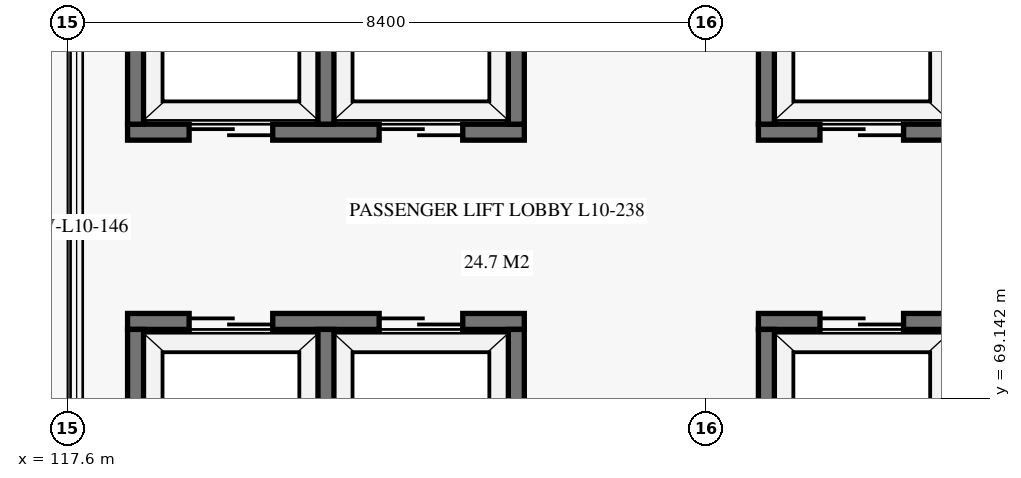
"""IFC4 building model, lengths in metres.
Left out: names, types, materials, properties, quantities, classifications, styles, units other than length and angle.
Written with IfcOpenShell. Run it as: python <this file> out.ifc"""

import sys

from ifc_helpers import new_model, si_unit, direction, frame, frame_2d, origin, place, context, subcontext, project, spatial, rectangle, extrude, element, fill, save


model = new_model("IFC4")
c1 = context("Model", 3, precision=1e-05, world=origin(), true_north=direction((0.0, 1.0)))
c2 = subcontext(c1, "Body", "Model", "MODEL_VIEW")
j1 = project(units=[si_unit("LENGTHUNIT", "METRE"), si_unit("PLANEANGLEUNIT", "RADIAN")], contexts=[c1])
p1 = place(None, origin())
s1 = spatial("IfcSite", under=j1, at=p1, CompositionType="ELEMENT")
p2 = place(p1, origin())
s2 = spatial("IfcBuilding", under=s1, at=p2, CompositionType="ELEMENT")
p3 = place(p2, frame((0.0, 0.0, 42.7)))
s3 = spatial("IfcBuildingStorey", under=s2, at=p3, CompositionType="ELEMENT", Elevation=42.7)
p4 = place(p3, frame((126.69, 70.155, 0.0), z_axis=(0.0, 0.0, 1.0), x_axis=(1.0, 0.0, 0.0)))
e1 = element("IfcWall", 1, at=p4, inside=s3, PredefinedType="SHEAR", context=c2, shape_type="SweptSolid", body=[
    extrude(rectangle(XDim=5.22, YDim=0.21, at=frame_2d((2.61, 0.0))), origin(), (0.0, 0.0, 1.0), 3.72),
])
p5 = place(p4, frame((0.81, 0.0, 0.0)))
e2 = element("IfcOpeningElement", 2, at=p5, cuts=e1, PredefinedType="OPENING", context=c2, shape_type="SweptSolid", body=[
    extrude(rectangle(XDim=1.1, YDim=2.15, at=frame_2d((0.55, 1.075))), frame((0.0, 0.115, 0.0), z_axis=(0.0, -1.0, 0.0), x_axis=(1.0, 0.0, 0.0)), (0.0, 0.0, 1.0), 0.23),
])
p6 = place(p4, frame((3.31, 0.0, 0.0)))
e3 = element("IfcOpeningElement", 3, at=p6, cuts=e1, PredefinedType="OPENING", context=c2, shape_type="SweptSolid", body=[
    extrude(rectangle(XDim=1.1, YDim=2.15, at=frame_2d((0.55, 1.075))), frame((0.0, 0.115, 0.0), z_axis=(0.0, -1.0, 0.0), x_axis=(1.0, 0.0, 0.0)), (0.0, 0.0, 1.0), 0.23),
])
p7 = place(p3, frame((126.795, 67.85, 0.0), z_axis=(0.0, 0.0, 1.0), x_axis=(0.0, 1.0, 0.0)))
e4 = element("IfcWall", 4, at=p7, inside=s3, PredefinedType="SHEAR", context=c2, shape_type="SweptSolid", body=[
    extrude(rectangle(XDim=2.2, YDim=0.21, at=frame_2d((1.1, 0.0))), origin(), (0.0, 0.0, 1.0), 3.72),
])
p8 = place(p3, frame((126.69, 72.645, 0.0), z_axis=(0.0, 0.0, 1.0), x_axis=(1.0, 0.0, 0.0)))
e5 = element("IfcWall", 5, at=p8, inside=s3, PredefinedType="SHEAR", context=c2, shape_type="SweptSolid", body=[
    extrude(rectangle(XDim=5.22, YDim=0.21, at=frame_2d((2.61, 0.0))), origin(), (0.0, 0.0, 1.0), 3.72),
])
p9 = place(p8, frame((0.81, 0.0, 0.0)))
e6 = element("IfcOpeningElement", 6, at=p9, cuts=e5, PredefinedType="OPENING", context=c2, shape_type="SweptSolid", body=[
    extrude(rectangle(XDim=1.1, YDim=2.15, at=frame_2d((0.55, 1.075))), frame((0.0, 0.115, 0.0), z_axis=(0.0, -1.0, 0.0), x_axis=(1.0, 0.0, 0.0)), (0.0, 0.0, 1.0), 0.23),
])
p10 = place(p8, frame((3.31, 0.0, 0.0)))
e7 = element("IfcOpeningElement", 7, at=p10, cuts=e5, PredefinedType="OPENING", context=c2, shape_type="SweptSolid", body=[
    extrude(rectangle(XDim=1.1, YDim=2.15, at=frame_2d((0.55, 1.075))), frame((0.0, 0.115, 0.0), z_axis=(0.0, -1.0, 0.0), x_axis=(1.0, 0.0, 0.0)), (0.0, 0.0, 1.0), 0.23),
])
p11 = place(p3, frame((126.795, 72.75, 0.0), z_axis=(0.0, 0.0, 1.0), x_axis=(0.0, 1.0, 0.0)))
e8 = element("IfcWall", 8, at=p11, inside=s3, PredefinedType="SHEAR", context=c2, shape_type="SweptSolid", body=[
    extrude(rectangle(XDim=2.2, YDim=0.21, at=frame_2d((1.1, 0.0))), origin(), (0.0, 0.0, 1.0), 3.72),
])
p12 = place(p3, frame((118.39, 70.155, 0.0), z_axis=(0.0, 0.0, 1.0), x_axis=(1.0, 0.0, 0.0)))
e9 = element("IfcWall", 9, at=p12, inside=s3, PredefinedType="SHEAR", context=c2, shape_type="SweptSolid", body=[
    extrude(rectangle(XDim=5.22, YDim=0.21, at=frame_2d((2.61, 0.0))), origin(), (0.0, 0.0, 1.0), 3.72),
])
p13 = place(p12, frame((0.81, 0.0, 0.0)))
e10 = element("IfcOpeningElement", 10, at=p13, cuts=e9, PredefinedType="OPENING", context=c2, shape_type="SweptSolid", body=[
    extrude(rectangle(XDim=1.1, YDim=2.15, at=frame_2d((0.55, 1.075))), frame((0.0, 0.115, 0.0), z_axis=(0.0, -1.0, 0.0), x_axis=(1.0, 0.0, 0.0)), (0.0, 0.0, 1.0), 0.23),
])
p14 = place(p12, frame((3.31, 0.0, 0.0)))
e11 = element("IfcOpeningElement", 11, at=p14, cuts=e9, PredefinedType="OPENING", context=c2, shape_type="SweptSolid", body=[
    extrude(rectangle(XDim=1.1, YDim=2.15, at=frame_2d((0.55, 1.075))), frame((0.0, 0.115, 0.0), z_axis=(0.0, -1.0, 0.0), x_axis=(1.0, 0.0, 0.0)), (0.0, 0.0, 1.0), 0.23),
])
for number, where, z_axis, x_axis in (
    (12, (118.495, 67.85, 0.0), (0.0, 0.0, 1.0), (0.0, 1.0, 0.0)),
    (13, (123.505, 67.85, 0.0), (0.0, 0.0, 1.0), (0.0, 1.0, 0.0)),
    (14, (121.0, 67.85, 0.0), (0.0, 0.0, 1.0), (0.0, 1.0, 0.0)),
):
    element("IfcWall", number, at=place(p3, frame(where, z_axis=z_axis, x_axis=x_axis)), inside=s3, PredefinedType="SHEAR", context=c2, shape_type="SweptSolid", body=[
        extrude(rectangle(XDim=2.2, YDim=0.21, at=frame_2d((1.1, 0.0))), origin(), (0.0, 0.0, 1.0), 3.72),
    ])
p15 = place(p3, frame((118.39, 72.645, 0.0), z_axis=(0.0, 0.0, 1.0), x_axis=(1.0, 0.0, 0.0)))
e15 = element("IfcWall", 15, at=p15, inside=s3, PredefinedType="SHEAR", context=c2, shape_type="SweptSolid", body=[
    extrude(rectangle(XDim=5.22, YDim=0.21, at=frame_2d((2.61, 0.0))), origin(), (0.0, 0.0, 1.0), 3.72),
])
p16 = place(p15, frame((0.81, 0.0, 0.0)))
e16 = element("IfcOpeningElement", 16, at=p16, cuts=e15, PredefinedType="OPENING", context=c2, shape_type="SweptSolid", body=[
    extrude(rectangle(XDim=1.1, YDim=2.15, at=frame_2d((0.55, 1.075))), frame((0.0, 0.115, 0.0), z_axis=(0.0, -1.0, 0.0), x_axis=(1.0, 0.0, 0.0)), (0.0, 0.0, 1.0), 0.23),
])
p17 = place(p15, frame((3.31, 0.0, 0.0)))
e17 = element("IfcOpeningElement", 17, at=p17, cuts=e15, PredefinedType="OPENING", context=c2, shape_type="SweptSolid", body=[
    extrude(rectangle(XDim=1.1, YDim=2.15, at=frame_2d((0.55, 1.075))), frame((0.0, 0.115, 0.0), z_axis=(0.0, -1.0, 0.0), x_axis=(1.0, 0.0, 0.0)), (0.0, 0.0, 1.0), 0.23),
])
for number, where, z_axis, x_axis in (
    (18, (118.495, 72.75, 0.0), (0.0, 0.0, 1.0), (0.0, 1.0, 0.0)),
    (19, (123.505, 72.75, 0.0), (0.0, 0.0, 1.0), (0.0, 1.0, 0.0)),
    (20, (121.0, 72.75, 0.0), (0.0, 0.0, 1.0), (0.0, 1.0, 0.0)),
):
    element("IfcWall", number, at=place(p3, frame(where, z_axis=z_axis, x_axis=x_axis)), inside=s3, PredefinedType="SHEAR", context=c2, shape_type="SweptSolid", body=[
        extrude(rectangle(XDim=2.2, YDim=0.21, at=frame_2d((1.1, 0.0))), origin(), (0.0, 0.0, 1.0), 3.72),
    ])
p18 = place(p5, origin())
e21 = element("IfcDoor", 21, at=p18, inside=s3, OperationType="DOUBLE_DOOR_SLIDING", PredefinedType="DOOR", context=c2, shape_type="SweptSolid", body=[
    extrude(rectangle(XDim=1.1, YDim=2.15, at=frame_2d((0.55, 1.075))), frame((0.0, 0.025, 0.0), z_axis=(0.0, -1.0, 0.0), x_axis=(1.0, 0.0, 0.0)), (0.0, 0.0, 1.0), 0.05),
])
fill(e2, e21)
p19 = place(p9, origin())
e22 = element("IfcDoor", 22, at=p19, inside=s3, OperationType="DOUBLE_DOOR_SLIDING", PredefinedType="DOOR", context=c2, shape_type="SweptSolid", body=[
    extrude(rectangle(XDim=1.1, YDim=2.15, at=frame_2d((0.55, 1.075))), frame((0.0, 0.025, 0.0), z_axis=(0.0, -1.0, 0.0), x_axis=(1.0, 0.0, 0.0)), (0.0, 0.0, 1.0), 0.05),
])
fill(e6, e22)
p20 = place(p13, origin())
e23 = element("IfcDoor", 23, at=p20, inside=s3, OperationType="DOUBLE_DOOR_SLIDING", PredefinedType="DOOR", context=c2, shape_type="SweptSolid", body=[
    extrude(rectangle(XDim=1.1, YDim=2.15, at=frame_2d((0.55, 1.075))), frame((0.0, 0.025, 0.0), z_axis=(0.0, -1.0, 0.0), x_axis=(1.0, 0.0, 0.0)), (0.0, 0.0, 1.0), 0.05),
])
fill(e10, e23)
p21 = place(p14, origin())
e24 = element("IfcDoor", 24, at=p21, inside=s3, OperationType="DOUBLE_DOOR_SLIDING", PredefinedType="DOOR", context=c2, shape_type="SweptSolid", body=[
    extrude(rectangle(XDim=1.1, YDim=2.15, at=frame_2d((0.55, 1.075))), frame((0.0, 0.025, 0.0), z_axis=(0.0, -1.0, 0.0), x_axis=(1.0, 0.0, 0.0)), (0.0, 0.0, 1.0), 0.05),
])
fill(e11, e24)
p22 = place(p16, origin())
e25 = element("IfcDoor", 25, at=p22, inside=s3, OperationType="DOUBLE_DOOR_SLIDING", PredefinedType="DOOR", context=c2, shape_type="SweptSolid", body=[
    extrude(rectangle(XDim=1.1, YDim=2.15, at=frame_2d((0.55, 1.075))), frame((0.0, 0.025, 0.0), z_axis=(0.0, -1.0, 0.0), x_axis=(1.0, 0.0, 0.0)), (0.0, 0.0, 1.0), 0.05),
])
fill(e16, e25)
p23 = place(p17, origin())
e26 = element("IfcDoor", 26, at=p23, inside=s3, OperationType="DOUBLE_DOOR_SLIDING", PredefinedType="DOOR", context=c2, shape_type="SweptSolid", body=[
    extrude(rectangle(XDim=1.1, YDim=2.15, at=frame_2d((0.55, 1.075))), frame((0.0, 0.025, 0.0), z_axis=(0.0, -1.0, 0.0), x_axis=(1.0, 0.0, 0.0)), (0.0, 0.0, 1.0), 0.05),
])
fill(e17, e26)
save(model, sys.argv[1])
